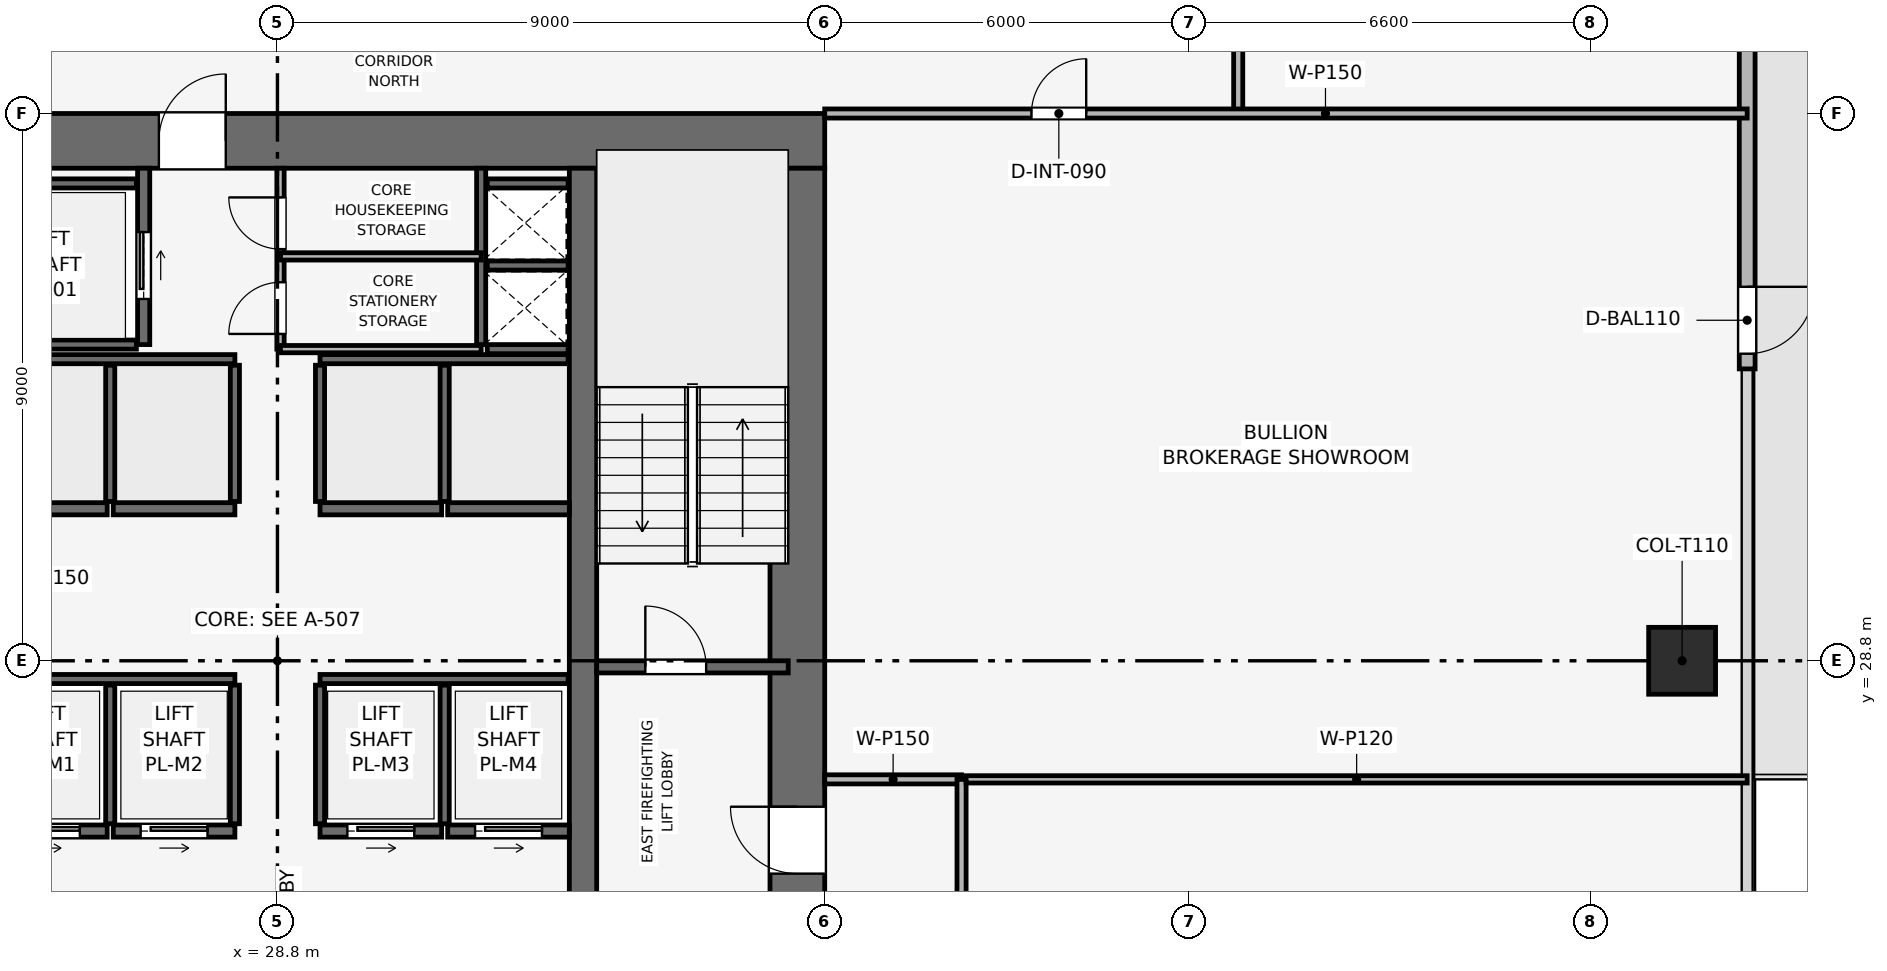
"""IFC4 building model, lengths in metres.
Left out: names, types, materials, properties, quantities, classifications, styles, units other than length and angle.
Written with IfcOpenShell. Run it as: python <this file> out.ifc"""

import sys

from ifc_helpers import new_model, si_unit, direction, frame, frame_2d, origin, origin_2d, place, context, subcontext, project, spatial, rectangle, extrude, element, fill, save


model = new_model("IFC4")
c1 = context("Model", 3, precision=1e-05, world=origin(), true_north=direction((0.0, 1.0)))
c2 = subcontext(c1, "Body", "Model", "MODEL_VIEW")
j1 = project(units=[si_unit("LENGTHUNIT", "METRE"), si_unit("PLANEANGLEUNIT", "RADIAN")], contexts=[c1])
p1 = place(None, origin())
s1 = spatial("IfcSite", under=j1, at=p1, CompositionType="ELEMENT")
p2 = place(p1, origin())
s2 = spatial("IfcBuilding", under=s1, at=p2, CompositionType="ELEMENT")
p3 = place(p2, frame((0.0, 0.0, 164.55)))
s3 = spatial("IfcBuildingStorey", under=s2, at=p3, CompositionType="ELEMENT", Elevation=164.55)
p4 = place(p3, frame((19.8, 37.35, 0.0), z_axis=(0.0, 0.0, 1.0), x_axis=(1.0, 0.0, 0.0)))
e1 = element("IfcWall", 1, at=p4, inside=s3, PredefinedType="SHEAR", context=c2, shape_type="SweptSolid", body=[
    extrude(rectangle(XDim=18.0, YDim=0.9, at=frame_2d((9.0, 0.0))), origin(), (0.0, 0.0, 1.0), 3.75),
])
p5 = place(p4, frame((7.05, 0.0, 0.0)))
e2 = element("IfcOpeningElement", 2, at=p5, cuts=e1, PredefinedType="OPENING", context=c2, shape_type="SweptSolid", body=[
    extrude(rectangle(XDim=1.1, YDim=2.15, at=frame_2d((0.55, 1.075))), frame((0.0, 0.46, 0.0), z_axis=(0.0, -1.0, 0.0), x_axis=(1.0, 0.0, 0.0)), (0.0, 0.0, 1.0), 0.92),
])
p6 = place(p3, frame((37.35, 20.7, 0.0), z_axis=(0.0, 0.0, 1.0), x_axis=(0.0, 1.0, 0.0)))
e3 = element("IfcWall", 3, at=p6, inside=s3, PredefinedType="SHEAR", context=c2, shape_type="SweptSolid", body=[
    extrude(rectangle(XDim=16.2, YDim=0.9, at=frame_2d((8.1, 0.0))), origin(), (0.0, 0.0, 1.0), 3.75),
])
p7 = place(p6, frame((4.6, 0.0, 0.0)))
e4 = element("IfcOpeningElement", 4, at=p7, cuts=e3, PredefinedType="OPENING", context=c2, shape_type="SweptSolid", body=[
    extrude(rectangle(XDim=1.1, YDim=2.15, at=frame_2d((0.55, 1.075))), frame((0.0, 0.46, 0.0), z_axis=(0.0, -1.0, 0.0), x_axis=(1.0, 0.0, 0.0)), (0.0, 0.0, 1.0), 0.92),
])
p8 = place(p3, frame((33.825, 20.7, 0.0), z_axis=(0.0, 0.0, 1.0), x_axis=(0.0, 1.0, 0.0)))
e5 = element("IfcWall", 5, at=p8, inside=s3, PredefinedType="SHEAR", context=c2, shape_type="SweptSolid", body=[
    extrude(rectangle(XDim=16.2, YDim=0.45, at=frame_2d((8.1, 0.0))), origin(), (0.0, 0.0, 1.0), 3.75),
])
p9 = place(p3, frame((51.9, 28.8, 0.003), z_axis=(0.0, 0.0, 1.0), x_axis=(1.0, 0.0, 0.0)))
e6 = element("IfcColumn", 6, at=p9, inside=s3, PredefinedType="COLUMN", context=c2, shape_type="SweptSolid", body=[
    extrude(rectangle(XDim=1.1, YDim=1.1, at=origin_2d()), origin(), (0.0, 0.0, 1.0), 3.489),
])
p10 = place(p3, frame((52.97, 46.2, 0.0), z_axis=(0.0, 0.0, 1.0), x_axis=(0.0, -1.0, 0.0)))
e7 = element("IfcWall", 7, at=p10, inside=s3, PredefinedType="SOLIDWALL", context=c2, shape_type="SweptSolid", body=[
    extrude(rectangle(XDim=12.6, YDim=0.26, at=frame_2d((6.3, 0.0))), origin(), (0.0, 0.0, 1.0), 3.495),
])
p11 = place(p10, frame((11.25, 0.0, 0.0)))
e8 = element("IfcOpeningElement", 8, at=p11, cuts=e7, PredefinedType="OPENING", context=c2, shape_type="SweptSolid", body=[
    extrude(rectangle(XDim=1.1, YDim=2.2, at=frame_2d((0.55, 1.1))), frame((0.0, 0.14, 0.0), z_axis=(0.0, -1.0, 0.0), x_axis=(1.0, 0.0, 0.0)), (0.0, 0.0, 1.0), 0.28),
])
p12 = place(p3, frame((34.05, 28.7, 0.0), z_axis=(0.0, 0.0, 1.0), x_axis=(1.0, 0.0, 0.0)))
e9 = element("IfcWall", 9, at=p12, inside=s3, PredefinedType="SHEAR", context=c2, shape_type="SweptSolid", body=[
    extrude(rectangle(XDim=3.15, YDim=0.2, at=frame_2d((1.575, 0.0))), origin(), (0.0, 0.0, 1.0), 3.495),
])
p13 = place(p12, frame((0.8, 0.0, 0.0)))
e10 = element("IfcOpeningElement", 10, at=p13, cuts=e9, PredefinedType="OPENING", context=c2, shape_type="SweptSolid", body=[
    extrude(rectangle(XDim=1.0, YDim=2.1, at=frame_2d((0.5, 1.05))), frame((0.0, 0.11, 0.0), z_axis=(0.0, -1.0, 0.0), x_axis=(1.0, 0.0, 0.0)), (0.0, 0.0, 1.0), 0.22),
])
p14 = place(p3, frame((32.15, 34.0, 0.0), z_axis=(0.0, 0.0, 1.0), x_axis=(0.0, 1.0, 0.0)))
e11 = element("IfcWall", 11, at=p14, inside=s3, PredefinedType="SHEAR", context=c2, shape_type="SweptSolid", body=[
    extrude(rectangle(XDim=2.9, YDim=0.15, at=frame_2d((1.45, 0.0))), origin(), (0.0, 0.0, 1.0), 3.495),
])
for number, where, z_axis, x_axis in (
    (12, (32.25, 33.925, 0.0), (0.0, 0.0, 1.0), (1.0, 0.0, 0.0)),
    (13, (32.25, 35.3, 0.0), (0.0, 0.0, 1.0), (1.0, 0.0, 0.0)),
):
    element("IfcWall", number, at=place(p3, frame(where, z_axis=z_axis, x_axis=x_axis)), inside=s3, PredefinedType="SHEAR", context=c2, shape_type="SweptSolid", body=[
        extrude(rectangle(XDim=1.33, YDim=0.15, at=frame_2d((0.665, 0.0))), origin(), (0.0, 0.0, 1.0), 3.495),
    ])
p15 = place(p3, frame((26.6, 34.0, 0.0), z_axis=(0.0, 0.0, 1.0), x_axis=(0.0, 1.0, 0.0)))
e14 = element("IfcWall", 14, at=p15, inside=s3, PredefinedType="SHEAR", context=c2, shape_type="SweptSolid", body=[
    extrude(rectangle(XDim=2.9, YDim=0.2, at=frame_2d((1.45, 0.0))), origin(), (0.0, 0.0, 1.0), 3.495),
])
p16 = place(p15, frame((0.75, 0.0, 0.0)))
e15 = element("IfcOpeningElement", 15, at=p16, cuts=e14, PredefinedType="OPENING", context=c2, shape_type="SweptSolid", body=[
    extrude(rectangle(XDim=1.1, YDim=2.15, at=frame_2d((0.55, 1.075))), frame((0.0, 0.11, 0.0), z_axis=(0.0, -1.0, 0.0), x_axis=(1.0, 0.0, 0.0)), (0.0, 0.0, 1.0), 0.22),
])
for number, where, z_axis, x_axis in (
    (16, (24.0, 34.0, 0.0), (0.0, 0.0, 1.0), (1.0, 0.0, 0.0)),
    (17, (24.0, 36.65, 0.0), (0.0, 0.0, 1.0), (1.0, 0.0, 0.0)),
):
    element("IfcWall", number, at=place(p3, frame(where, z_axis=z_axis, x_axis=x_axis)), inside=s3, PredefinedType="SHEAR", context=c2, shape_type="SweptSolid", body=[
        extrude(rectangle(XDim=2.48, YDim=0.15, at=frame_2d((1.24, 0.0))), origin(), (0.0, 0.0, 1.0), 3.495),
    ])
p17 = place(p3, frame((24.0, 26.0, 0.0), z_axis=(0.0, 0.0, 1.0), x_axis=(1.0, 0.0, 0.0)))
e18 = element("IfcWall", 18, at=p17, inside=s3, PredefinedType="SHEAR", context=c2, shape_type="SweptSolid", body=[
    extrude(rectangle(XDim=2.0, YDim=0.2, at=frame_2d((1.0, 0.0))), origin(), (0.0, 0.0, 1.0), 3.495),
])
p18 = place(p17, frame((0.45, 0.0, 0.0)))
e19 = element("IfcOpeningElement", 19, at=p18, cuts=e18, PredefinedType="OPENING", context=c2, shape_type="SweptSolid", body=[
    extrude(rectangle(XDim=1.1, YDim=2.15, at=frame_2d((0.55, 1.075))), frame((0.0, 0.11, 0.0), z_axis=(0.0, -1.0, 0.0), x_axis=(1.0, 0.0, 0.0)), (0.0, 0.0, 1.0), 0.22),
])
p19 = place(p3, frame((26.1, 26.0, 0.0), z_axis=(0.0, 0.0, 1.0), x_axis=(1.0, 0.0, 0.0)))
e20 = element("IfcWall", 20, at=p19, inside=s3, PredefinedType="SHEAR", context=c2, shape_type="SweptSolid", body=[
    extrude(rectangle(XDim=2.0, YDim=0.2, at=frame_2d((1.0, 0.0))), origin(), (0.0, 0.0, 1.0), 3.495),
])
p20 = place(p19, frame((0.45, 0.0, 0.0)))
e21 = element("IfcOpeningElement", 21, at=p20, cuts=e20, PredefinedType="OPENING", context=c2, shape_type="SweptSolid", body=[
    extrude(rectangle(XDim=1.1, YDim=2.15, at=frame_2d((0.55, 1.075))), frame((0.0, 0.11, 0.0), z_axis=(0.0, -1.0, 0.0), x_axis=(1.0, 0.0, 0.0)), (0.0, 0.0, 1.0), 0.22),
])
p21 = place(p3, frame((29.5, 26.0, 0.0), z_axis=(0.0, 0.0, 1.0), x_axis=(1.0, 0.0, 0.0)))
e22 = element("IfcWall", 22, at=p21, inside=s3, PredefinedType="SHEAR", context=c2, shape_type="SweptSolid", body=[
    extrude(rectangle(XDim=2.0, YDim=0.2, at=frame_2d((1.0, 0.0))), origin(), (0.0, 0.0, 1.0), 3.495),
])
p22 = place(p21, frame((0.45, 0.0, 0.0)))
e23 = element("IfcOpeningElement", 23, at=p22, cuts=e22, PredefinedType="OPENING", context=c2, shape_type="SweptSolid", body=[
    extrude(rectangle(XDim=1.1, YDim=2.15, at=frame_2d((0.55, 1.075))), frame((0.0, 0.11, 0.0), z_axis=(0.0, -1.0, 0.0), x_axis=(1.0, 0.0, 0.0)), (0.0, 0.0, 1.0), 0.22),
])
p23 = place(p3, frame((31.6, 26.0, 0.0), z_axis=(0.0, 0.0, 1.0), x_axis=(1.0, 0.0, 0.0)))
e24 = element("IfcWall", 24, at=p23, inside=s3, PredefinedType="SHEAR", context=c2, shape_type="SweptSolid", body=[
    extrude(rectangle(XDim=2.0, YDim=0.2, at=frame_2d((1.0, 0.0))), origin(), (0.0, 0.0, 1.0), 3.495),
])
p24 = place(p23, frame((0.45, 0.0, 0.0)))
e25 = element("IfcOpeningElement", 25, at=p24, cuts=e24, PredefinedType="OPENING", context=c2, shape_type="SweptSolid", body=[
    extrude(rectangle(XDim=1.1, YDim=2.15, at=frame_2d((0.55, 1.075))), frame((0.0, 0.11, 0.0), z_axis=(0.0, -1.0, 0.0), x_axis=(1.0, 0.0, 0.0)), (0.0, 0.0, 1.0), 0.22),
])
for number, where, z_axis, x_axis in (
    (26, (24.0, 31.3, 0.0), (0.0, 0.0, 1.0), (1.0, 0.0, 0.0)),
    (27, (26.1, 31.3, 0.0), (0.0, 0.0, 1.0), (1.0, 0.0, 0.0)),
    (28, (29.5, 31.3, 0.0), (0.0, 0.0, 1.0), (1.0, 0.0, 0.0)),
    (29, (31.6, 31.3, 0.0), (0.0, 0.0, 1.0), (1.0, 0.0, 0.0)),
):
    element("IfcWall", number, at=place(p3, frame(where, z_axis=z_axis, x_axis=x_axis)), inside=s3, PredefinedType="SHEAR", context=c2, shape_type="SweptSolid", body=[
        extrude(rectangle(XDim=2.0, YDim=0.2, at=frame_2d((1.0, 0.0))), origin(), (0.0, 0.0, 1.0), 3.495),
    ])
p25 = place(p3, frame((32.25, 36.65, 0.0), z_axis=(0.0, 0.0, 1.0), x_axis=(1.0, 0.0, 0.0)))
e30 = element("IfcWall", 30, at=p25, inside=s3, PredefinedType="SHEAR", context=c2, shape_type="SweptSolid", body=[
    extrude(rectangle(XDim=1.33, YDim=0.15, at=frame_2d((0.665, 0.0))), origin(), (0.0, 0.0, 1.0), 3.495),
])
for number, where, z_axis, x_axis in (
    (31, (24.02, 28.5, 0.0), (0.0, 0.0, 1.0), (1.0, 0.0, 0.0)),
    (32, (29.5, 28.5, 0.0), (0.0, 0.0, 1.0), (1.0, 0.0, 0.0)),
):
    element("IfcWall", number, at=place(p3, frame(where, z_axis=z_axis, x_axis=x_axis)), inside=s3, PredefinedType="SHEAR", context=c2, shape_type="SweptSolid", body=[
        extrude(rectangle(XDim=4.08, YDim=0.15, at=frame_2d((2.04, 0.0))), origin(), (0.0, 0.0, 1.0), 3.495),
    ])
for number, where, z_axis, x_axis in (
    (33, (26.05, 26.12, 0.0), (0.0, 0.0, 1.0), (0.0, 1.0, 0.0)),
    (34, (28.1, 26.12, 0.0), (0.0, 0.0, 1.0), (0.0, 1.0, 0.0)),
    (35, (29.5, 26.12, 0.0), (0.0, 0.0, 1.0), (0.0, 1.0, 0.0)),
    (36, (31.55, 26.12, 0.0), (0.0, 0.0, 1.0), (0.0, 1.0, 0.0)),
):
    element("IfcWall", number, at=place(p3, frame(where, z_axis=z_axis, x_axis=x_axis)), inside=s3, PredefinedType="SHEAR", context=c2, shape_type="SweptSolid", body=[
        extrude(rectangle(XDim=2.28, YDim=0.15, at=frame_2d((1.14, 0.0))), origin(), (0.0, 0.0, 1.0), 3.495),
    ])
for number, where, z_axis, x_axis in (
    (37, (24.02, 33.76, 0.0), (0.0, 0.0, 1.0), (1.0, 0.0, 0.0)),
    (38, (29.5, 33.76, 0.0), (0.0, 0.0, 1.0), (1.0, 0.0, 0.0)),
):
    element("IfcWall", number, at=place(p3, frame(where, z_axis=z_axis, x_axis=x_axis)), inside=s3, PredefinedType="SHEAR", context=c2, shape_type="SweptSolid", body=[
        extrude(rectangle(XDim=4.08, YDim=0.15, at=frame_2d((2.04, 0.0))), origin(), (0.0, 0.0, 1.0), 3.495),
    ])
for number, where, z_axis, x_axis in (
    (39, (26.05, 31.42, 0.0), (0.0, 0.0, 1.0), (0.0, 1.0, 0.0)),
    (40, (28.1, 31.42, 0.0), (0.0, 0.0, 1.0), (0.0, 1.0, 0.0)),
    (41, (29.5, 31.42, 0.0), (0.0, 0.0, 1.0), (0.0, 1.0, 0.0)),
    (42, (31.55, 31.42, 0.0), (0.0, 0.0, 1.0), (0.0, 1.0, 0.0)),
):
    element("IfcWall", number, at=place(p3, frame(where, z_axis=z_axis, x_axis=x_axis)), inside=s3, PredefinedType="SHEAR", context=c2, shape_type="SweptSolid", body=[
        extrude(rectangle(XDim=2.24, YDim=0.15, at=frame_2d((1.12, 0.0))), origin(), (0.0, 0.0, 1.0), 3.495),
    ])
p26 = place(p3, frame((28.85, 33.925, 0.0), z_axis=(0.0, 0.0, 1.0), x_axis=(0.0, 1.0, 0.0)))
e43 = element("IfcWall", 43, at=p26, inside=s3, PredefinedType="PARTITIONING", context=c2, shape_type="SweptSolid", body=[
    extrude(rectangle(XDim=2.975, YDim=0.12, at=frame_2d((1.487, 0.0))), origin(), (0.0, 0.0, 1.0), 3.495),
])
p27 = place(p26, frame((0.25, 0.0, 0.0)))
e44 = element("IfcOpeningElement", 44, at=p27, cuts=e43, PredefinedType="OPENING", context=c2, shape_type="SweptSolid", body=[
    extrude(rectangle(XDim=0.85, YDim=2.1, at=frame_2d((0.425, 1.05))), frame((0.0, 0.07, 0.0), z_axis=(0.0, -1.0, 0.0), x_axis=(1.0, 0.0, 0.0)), (0.0, 0.0, 1.0), 0.14),
])
p28 = place(p26, frame((1.645, 0.0, 0.0)))
e45 = element("IfcOpeningElement", 45, at=p28, cuts=e43, PredefinedType="OPENING", context=c2, shape_type="SweptSolid", body=[
    extrude(rectangle(XDim=0.85, YDim=2.1, at=frame_2d((0.425, 1.05))), frame((0.0, 0.07, 0.0), z_axis=(0.0, -1.0, 0.0), x_axis=(1.0, 0.0, 0.0)), (0.0, 0.0, 1.0), 0.14),
])
for number, where, z_axis, x_axis in (
    (46, (28.85, 35.45, 0.0), (0.0, 0.0, 1.0), (1.0, 0.0, 0.0)),
    (47, (28.85, 33.925, 0.0), (0.0, 0.0, 1.0), (1.0, 0.0, 0.0)),
):
    element("IfcWall", number, at=place(p3, frame(where, z_axis=z_axis, x_axis=x_axis)), inside=s3, PredefinedType="PARTITIONING", context=c2, shape_type="SweptSolid", body=[
        extrude(rectangle(XDim=3.3, YDim=0.12, at=frame_2d((1.65, 0.0))), origin(), (0.0, 0.0, 1.0), 3.495),
    ])
p29 = place(p3, frame((37.8, 26.85, 0.0), z_axis=(0.0, 0.0, 1.0), x_axis=(1.0, 0.0, 0.0)))
e48 = element("IfcWall", 48, at=p29, inside=s3, PredefinedType="PARTITIONING", context=c2, shape_type="SweptSolid", body=[
    extrude(rectangle(XDim=2.25, YDim=0.15, at=frame_2d((1.125, 0.0))), origin(), (0.0, 0.0, 1.0), 3.495),
])
p30 = place(p3, frame((40.05, 19.8, 0.0), z_axis=(0.0, 0.0, 1.0), x_axis=(0.0, 1.0, 0.0)))
e49 = element("IfcWall", 49, at=p30, inside=s3, PredefinedType="PARTITIONING", context=c2, shape_type="SweptSolid", body=[
    extrude(rectangle(XDim=7.05, YDim=0.15, at=frame_2d((3.525, 0.0))), origin(), (0.0, 0.0, 1.0), 3.03),
])
p31 = place(p3, frame((40.125, 26.85, 0.0), z_axis=(0.0, 0.0, 1.0), x_axis=(1.0, 0.0, 0.0)))
e50 = element("IfcWall", 50, at=p31, inside=s3, PredefinedType="PARTITIONING", context=c2, shape_type="SweptSolid", body=[
    extrude(rectangle(XDim=12.845, YDim=0.12, at=frame_2d((6.422, 0.0))), origin(), (0.0, 0.0, 1.0), 2.98),
])
p32 = place(p3, frame((44.6, 37.8, 0.0), z_axis=(0.0, 0.0, 1.0), x_axis=(0.0, 1.0, 0.0)))
e51 = element("IfcWall", 51, at=p32, inside=s3, PredefinedType="PARTITIONING", context=c2, shape_type="SweptSolid", body=[
    extrude(rectangle(XDim=2.4, YDim=0.15, at=frame_2d((1.2, 0.0))), origin(), (0.0, 0.0, 1.0), 3.495),
])
p33 = place(p3, frame((37.8, 37.8, 0.0), z_axis=(0.0, 0.0, 1.0), x_axis=(1.0, 0.0, 0.0)))
e52 = element("IfcWall", 52, at=p33, inside=s3, PredefinedType="PARTITIONING", context=c2, shape_type="SweptSolid", body=[
    extrude(rectangle(XDim=15.17, YDim=0.15, at=frame_2d((7.585, 0.0))), origin(), (0.0, 0.0, 1.0), 2.98),
])
p34 = place(p33, frame((3.4, 0.0, 0.0)))
e53 = element("IfcOpeningElement", 53, at=p34, cuts=e52, PredefinedType="OPENING", context=c2, shape_type="SweptSolid", body=[
    extrude(rectangle(XDim=0.9, YDim=2.1, at=frame_2d((0.45, 1.05))), frame((0.0, 0.085, 0.0), z_axis=(0.0, -1.0, 0.0), x_axis=(1.0, 0.0, 0.0)), (0.0, 0.0, 1.0), 0.17),
])
p35 = place(p11, origin())
e54 = element("IfcDoor", 54, at=p35, inside=s3, OperationType="SINGLE_SWING_LEFT", PredefinedType="DOOR", context=c2, shape_type="SweptSolid", body=[
    extrude(rectangle(XDim=1.1, YDim=2.2, at=frame_2d((0.55, 1.1))), frame((0.0, 0.025, 0.0), z_axis=(0.0, -1.0, 0.0), x_axis=(1.0, 0.0, 0.0)), (0.0, 0.0, 1.0), 0.05),
])
fill(e8, e54)
p36 = place(p13, origin())
e55 = element("IfcDoor", 55, at=p36, inside=s3, OperationType="SINGLE_SWING_LEFT", PredefinedType="DOOR", context=c2, shape_type="SweptSolid", body=[
    extrude(rectangle(XDim=1.0, YDim=2.1, at=frame_2d((0.5, 1.05))), frame((0.0, 0.025, 0.0), z_axis=(0.0, -1.0, 0.0), x_axis=(1.0, 0.0, 0.0)), (0.0, 0.0, 1.0), 0.05),
])
fill(e10, e55)
p37 = place(p16, origin())
e56 = element("IfcDoor", 56, at=p37, inside=s3, OperationType="SLIDING_TO_RIGHT", PredefinedType="DOOR", context=c2, shape_type="SweptSolid", body=[
    extrude(rectangle(XDim=1.1, YDim=2.15, at=frame_2d((0.55, 1.075))), frame((0.0, 0.025, 0.0), z_axis=(0.0, -1.0, 0.0), x_axis=(1.0, 0.0, 0.0)), (0.0, 0.0, 1.0), 0.05),
])
fill(e15, e56)
p38 = place(p18, origin())
e57 = element("IfcDoor", 57, at=p38, inside=s3, OperationType="SLIDING_TO_RIGHT", PredefinedType="DOOR", context=c2, shape_type="SweptSolid", body=[
    extrude(rectangle(XDim=1.1, YDim=2.15, at=frame_2d((0.55, 1.075))), frame((0.0, 0.025, 0.0), z_axis=(0.0, -1.0, 0.0), x_axis=(1.0, 0.0, 0.0)), (0.0, 0.0, 1.0), 0.05),
])
fill(e19, e57)
p39 = place(p20, origin())
e58 = element("IfcDoor", 58, at=p39, inside=s3, OperationType="SLIDING_TO_RIGHT", PredefinedType="DOOR", context=c2, shape_type="SweptSolid", body=[
    extrude(rectangle(XDim=1.1, YDim=2.15, at=frame_2d((0.55, 1.075))), frame((0.0, 0.025, 0.0), z_axis=(0.0, -1.0, 0.0), x_axis=(1.0, 0.0, 0.0)), (0.0, 0.0, 1.0), 0.05),
])
fill(e21, e58)
p40 = place(p22, origin())
e59 = element("IfcDoor", 59, at=p40, inside=s3, OperationType="SLIDING_TO_RIGHT", PredefinedType="DOOR", context=c2, shape_type="SweptSolid", body=[
    extrude(rectangle(XDim=1.1, YDim=2.15, at=frame_2d((0.55, 1.075))), frame((0.0, 0.025, 0.0), z_axis=(0.0, -1.0, 0.0), x_axis=(1.0, 0.0, 0.0)), (0.0, 0.0, 1.0), 0.05),
])
fill(e23, e59)
p41 = place(p24, origin())
e60 = element("IfcDoor", 60, at=p41, inside=s3, OperationType="SLIDING_TO_RIGHT", PredefinedType="DOOR", context=c2, shape_type="SweptSolid", body=[
    extrude(rectangle(XDim=1.1, YDim=2.15, at=frame_2d((0.55, 1.075))), frame((0.0, 0.025, 0.0), z_axis=(0.0, -1.0, 0.0), x_axis=(1.0, 0.0, 0.0)), (0.0, 0.0, 1.0), 0.05),
])
fill(e25, e60)
p42 = place(p27, origin())
e61 = element("IfcDoor", 61, at=p42, inside=s3, OperationType="SINGLE_SWING_LEFT", PredefinedType="DOOR", context=c2, shape_type="SweptSolid", body=[
    extrude(rectangle(XDim=0.85, YDim=2.1, at=frame_2d((0.425, 1.05))), frame((0.0, 0.025, 0.0), z_axis=(0.0, -1.0, 0.0), x_axis=(1.0, 0.0, 0.0)), (0.0, 0.0, 1.0), 0.05),
])
fill(e44, e61)
p43 = place(p28, origin())
e62 = element("IfcDoor", 62, at=p43, inside=s3, OperationType="SINGLE_SWING_RIGHT", PredefinedType="DOOR", context=c2, shape_type="SweptSolid", body=[
    extrude(rectangle(XDim=0.85, YDim=2.1, at=frame_2d((0.425, 1.05))), frame((0.0, 0.025, 0.0), z_axis=(0.0, -1.0, 0.0), x_axis=(1.0, 0.0, 0.0)), (0.0, 0.0, 1.0), 0.05),
])
fill(e45, e62)
p44 = place(p34, origin())
e63 = element("IfcDoor", 63, at=p44, inside=s3, OperationType="SINGLE_SWING_RIGHT", PredefinedType="DOOR", context=c2, shape_type="SweptSolid", body=[
    extrude(rectangle(XDim=0.9, YDim=2.1, at=frame_2d((0.45, 1.05))), frame((0.0, 0.025, 0.0), z_axis=(0.0, -1.0, 0.0), x_axis=(1.0, 0.0, 0.0)), (0.0, 0.0, 1.0), 0.05),
])
fill(e53, e63)
p45 = place(p7, origin())
e64 = element("IfcDoor", 64, at=p45, inside=s3, OperationType="SINGLE_SWING_RIGHT", PredefinedType="DOOR", context=c2, shape_type="SweptSolid", body=[
    extrude(rectangle(XDim=1.1, YDim=2.15, at=frame_2d((0.55, 1.075))), frame((0.0, 0.025, 0.0), z_axis=(0.0, -1.0, 0.0), x_axis=(1.0, 0.0, 0.0)), (0.0, 0.0, 1.0), 0.05),
])
fill(e4, e64)
p46 = place(p5, origin())
e65 = element("IfcDoor", 65, at=p46, inside=s3, OperationType="SINGLE_SWING_RIGHT", PredefinedType="DOOR", context=c2, shape_type="SweptSolid", body=[
    extrude(rectangle(XDim=1.1, YDim=2.15, at=frame_2d((0.55, 1.075))), frame((0.0, 0.025, 0.0), z_axis=(0.0, -1.0, 0.0), x_axis=(1.0, 0.0, 0.0)), (0.0, 0.0, 1.0), 0.05),
])
fill(e2, e65)
save(model, sys.argv[1])
